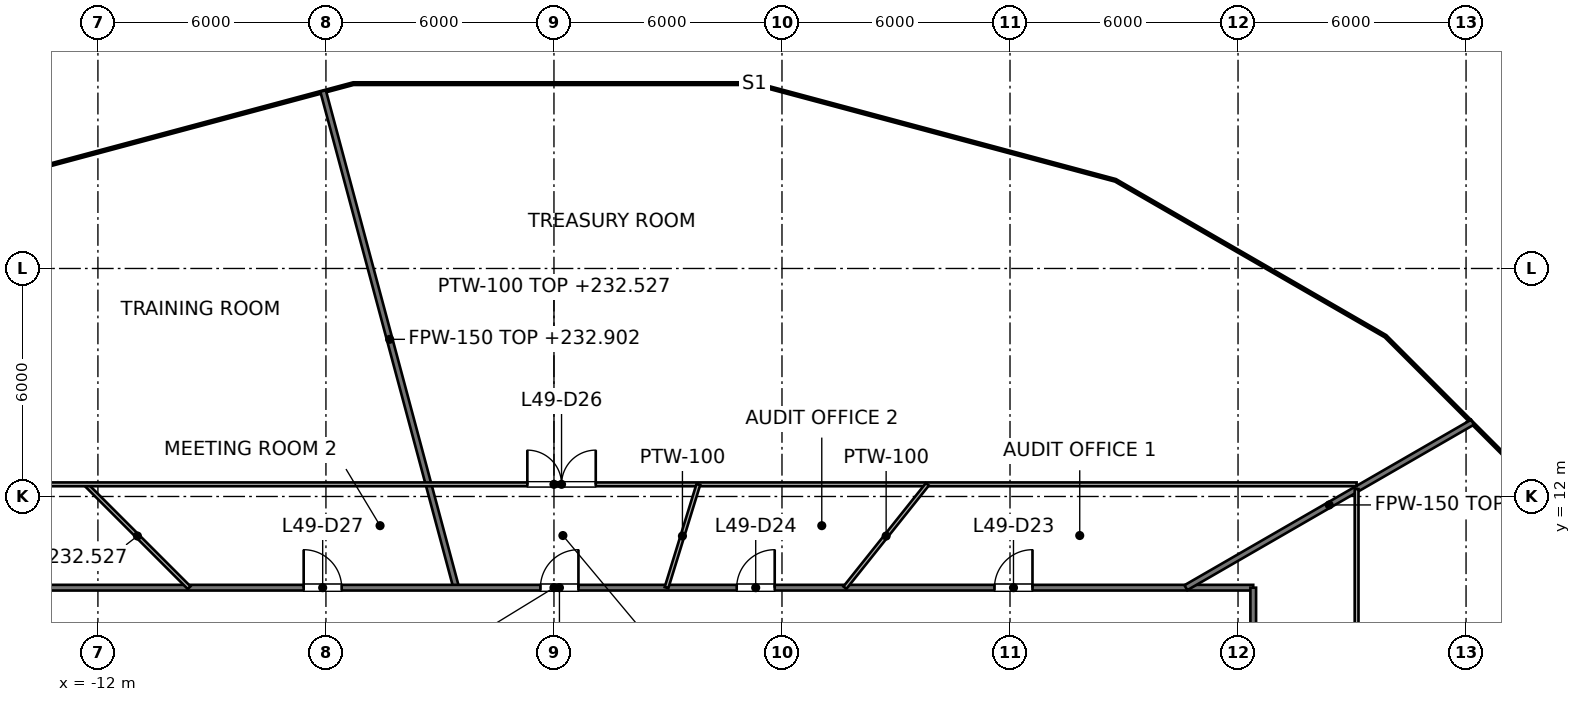
"""IFC4 building model, lengths in metres.
Left out: names, types, materials, properties, quantities, classifications, styles, units other than length and angle.
Written with IfcOpenShell. Run it as: python <this file> out.ifc"""

import sys

from ifc_helpers import new_model, si_unit, direction, frame, frame_2d, origin, place, context, subcontext, project, spatial, rectangle, extrude, element, fill, save


model = new_model("IFC4")
c1 = context("Model", 3, precision=1e-05, world=origin(), true_north=direction((0.0, 1.0)))
c2 = subcontext(c1, "Body", "Model", "MODEL_VIEW")
j1 = project(units=[si_unit("LENGTHUNIT", "METRE"), si_unit("PLANEANGLEUNIT", "RADIAN")], contexts=[c1])
p1 = place(None, origin())
s1 = spatial("IfcSite", under=j1, at=p1, CompositionType="ELEMENT")
p2 = place(p1, origin())
s2 = spatial("IfcBuilding", under=s1, at=p2, CompositionType="ELEMENT")
p3 = place(p2, frame((0.0, 0.0, 229.6)))
s3 = spatial("IfcBuildingStorey", under=s2, at=p3, CompositionType="ELEMENT", Elevation=229.6)
p4 = place(p3, frame((-6.075, 22.671, 0.0), z_axis=(0.0, 0.0, 1.0), x_axis=(0.258861735869, -0.965914386322, 0.0)))
e1 = element("IfcWall", 1, at=p4, inside=s3, PredefinedType="PARTITIONING", context=c2, shape_type="SweptSolid", body=[
    extrude(rectangle(XDim=13.532, YDim=0.15, at=frame_2d((6.766, 0.0))), origin(), (0.0, 0.0, 1.0), 3.302),
])
p5 = place(p3, frame((-18.4, 9.6, 0.0), z_axis=(0.0, 0.0, 1.0), x_axis=(1.0, 0.0, 0.0)))
e2 = element("IfcWall", 2, at=p5, inside=s3, PredefinedType="PARTITIONING", context=c2, shape_type="SweptSolid", body=[
    extrude(rectangle(XDim=36.8, YDim=0.15, at=frame_2d((18.4, 0.0))), origin(), (0.0, 0.0, 1.0), 2.927),
])
p6 = place(p5, frame((29.991, 0.0, 0.0)))
e3 = element("IfcOpeningElement", 3, at=p6, cuts=e2, PredefinedType="OPENING", context=c2, shape_type="SweptSolid", body=[
    extrude(rectangle(XDim=1.0, YDim=2.1, at=frame_2d((0.5, 1.05))), frame((0.0, 0.075, 0.0), z_axis=(0.0, -1.0, 0.0), x_axis=(1.0, 0.0, 0.0)), (0.0, 0.0, 1.0), 0.15),
])
p7 = place(p5, frame((23.208, 0.0, 0.0)))
e4 = element("IfcOpeningElement", 4, at=p7, cuts=e2, PredefinedType="OPENING", context=c2, shape_type="SweptSolid", body=[
    extrude(rectangle(XDim=1.0, YDim=2.1, at=frame_2d((0.5, 1.05))), frame((0.0, 0.075, 0.0), z_axis=(0.0, -1.0, 0.0), x_axis=(1.0, 0.0, 0.0)), (0.0, 0.0, 1.0), 0.15),
])
p8 = place(p5, frame((18.044, 0.0, 0.0)))
e5 = element("IfcOpeningElement", 5, at=p8, cuts=e2, PredefinedType="OPENING", context=c2, shape_type="SweptSolid", body=[
    extrude(rectangle(XDim=1.0, YDim=2.1, at=frame_2d((0.5, 1.05))), frame((0.0, 0.075, 0.0), z_axis=(0.0, -1.0, 0.0), x_axis=(1.0, 0.0, 0.0)), (0.0, 0.0, 1.0), 0.15),
])
p9 = place(p5, frame((11.814, 0.0, 0.0)))
e6 = element("IfcOpeningElement", 6, at=p9, cuts=e2, PredefinedType="OPENING", context=c2, shape_type="SweptSolid", body=[
    extrude(rectangle(XDim=1.0, YDim=2.1, at=frame_2d((0.5, 1.05))), frame((0.0, 0.075, 0.0), z_axis=(0.0, -1.0, 0.0), x_axis=(1.0, 0.0, 0.0)), (0.0, 0.0, 1.0), 0.15),
])
p10 = place(p3, frame((16.628, 9.6, 0.0), z_axis=(0.0, 0.0, 1.0), x_axis=(0.866023145199, 0.500003911965, 0.0)))
e7 = element("IfcWall", 7, at=p10, inside=s3, PredefinedType="PARTITIONING", context=c2, shape_type="SweptSolid", body=[
    extrude(rectangle(XDim=8.71, YDim=0.15, at=frame_2d((4.355, 0.0))), origin(), (0.0, 0.0, 1.0), 2.995),
])
p11 = place(p3, frame((18.4, -9.6, 0.0), z_axis=(0.0, 0.0, 1.0), x_axis=(0.0, 1.0, 0.0)))
e8 = element("IfcWall", 8, at=p11, inside=s3, PredefinedType="PARTITIONING", context=c2, shape_type="SweptSolid", body=[
    extrude(rectangle(XDim=19.2, YDim=0.15, at=frame_2d((9.6, 0.0))), origin(), (0.0, 0.0, 1.0), 2.918),
])
p12 = place(p11, frame((11.385, 0.0, 0.0)))
e9 = element("IfcOpeningElement", 9, at=p12, cuts=e8, PredefinedType="OPENING", context=c2, shape_type="SweptSolid", body=[
    extrude(rectangle(XDim=1.0, YDim=2.1, at=frame_2d((0.5, 1.05))), frame((0.0, 0.075, 0.0), z_axis=(0.0, -1.0, 0.0), x_axis=(1.0, 0.0, 0.0)), (0.0, 0.0, 1.0), 0.15),
])
p13 = place(p3, frame((-12.32, 12.32, 0.0), z_axis=(0.0, 0.0, 1.0), x_axis=(0.707106781187, -0.707106781187, 0.0)))
e10 = element("IfcWall", 10, at=p13, inside=s3, PredefinedType="PARTITIONING", context=c2, shape_type="SweptSolid", body=[
    extrude(rectangle(XDim=3.847, YDim=0.1, at=frame_2d((1.923, 0.0))), origin(), (0.0, 0.0, 1.0), 2.927),
])
p14 = place(p3, frame((-21.12, 12.32, 0.0), z_axis=(0.0, 0.0, 1.0), x_axis=(1.0, 0.0, 0.0)))
e11 = element("IfcWall", 11, at=p14, inside=s3, PredefinedType="PARTITIONING", context=c2, shape_type="SweptSolid", body=[
    extrude(rectangle(XDim=42.24, YDim=0.1, at=frame_2d((21.12, 0.0))), origin(), (0.0, 0.0, 1.0), 2.927),
])
p15 = place(p14, frame((20.419, 0.0, 0.0)))
e12 = element("IfcOpeningElement", 12, at=p15, cuts=e11, PredefinedType="OPENING", context=c2, shape_type="SweptSolid", body=[
    extrude(rectangle(XDim=1.8, YDim=2.1, at=frame_2d((0.9, 1.05))), frame((0.0, 0.05, 0.0), z_axis=(0.0, -1.0, 0.0), x_axis=(1.0, 0.0, 0.0)), (0.0, 0.0, 1.0), 0.1),
])
p16 = place(p3, frame((7.656, 9.6, 0.0), z_axis=(0.0, 0.0, 1.0), x_axis=(0.623461874371, 0.78185375308, 0.0)))
e13 = element("IfcWall", 13, at=p16, inside=s3, PredefinedType="PARTITIONING", context=c2, shape_type="SweptSolid", body=[
    extrude(rectangle(XDim=3.479, YDim=0.1, at=frame_2d((1.739, 0.0))), origin(), (0.0, 0.0, 1.0), 3.85),
])
p17 = place(p3, frame((2.961, 9.6, 0.0), z_axis=(0.0, 0.0, 1.0), x_axis=(0.294790935958, 0.955561774077, 0.0)))
e14 = element("IfcWall", 14, at=p17, inside=s3, PredefinedType="PARTITIONING", context=c2, shape_type="SweptSolid", body=[
    extrude(rectangle(XDim=2.846, YDim=0.1, at=frame_2d((1.423, 0.0))), origin(), (0.0, 0.0, 1.0), 3.85),
])
p18 = place(p3, frame((21.12, -12.32, 0.0), z_axis=(0.0, 0.0, 1.0), x_axis=(0.0, 1.0, 0.0)))
e15 = element("IfcWall", 15, at=p18, inside=s3, PredefinedType="PARTITIONING", context=c2, shape_type="SweptSolid", body=[
    extrude(rectangle(XDim=24.513, YDim=0.1, at=frame_2d((12.257, 0.0))), origin(), (0.0, 0.0, 1.0), 2.918),
])
p19 = place(p18, frame((14.687, 0.0, 0.0)))
e16 = element("IfcOpeningElement", 16, at=p19, cuts=e15, PredefinedType="OPENING", context=c2, shape_type="SweptSolid", body=[
    extrude(rectangle(XDim=1.8, YDim=2.1, at=frame_2d((0.9, 1.05))), frame((0.0, 0.05, 0.0), z_axis=(0.0, -1.0, 0.0), x_axis=(1.0, 0.0, 0.0)), (0.0, 0.0, 1.0), 0.1),
])
p20 = place(p6, origin())
e17 = element("IfcDoor", 17, at=p20, inside=s3, OperationType="SINGLE_SWING_RIGHT", PredefinedType="DOOR", context=c2, shape_type="SweptSolid", body=[
    extrude(rectangle(XDim=1.0, YDim=2.1, at=frame_2d((0.5, 1.05))), frame((0.0, 0.025, 0.0), z_axis=(0.0, -1.0, 0.0), x_axis=(1.0, 0.0, 0.0)), (0.0, 0.0, 1.0), 0.05),
])
fill(e3, e17)
p21 = place(p7, origin())
e18 = element("IfcDoor", 18, at=p21, inside=s3, OperationType="SINGLE_SWING_RIGHT", PredefinedType="DOOR", context=c2, shape_type="SweptSolid", body=[
    extrude(rectangle(XDim=1.0, YDim=2.1, at=frame_2d((0.5, 1.05))), frame((0.0, 0.025, 0.0), z_axis=(0.0, -1.0, 0.0), x_axis=(1.0, 0.0, 0.0)), (0.0, 0.0, 1.0), 0.05),
])
fill(e4, e18)
p22 = place(p8, origin())
e19 = element("IfcDoor", 19, at=p22, inside=s3, OperationType="SINGLE_SWING_RIGHT", PredefinedType="DOOR", context=c2, shape_type="SweptSolid", body=[
    extrude(rectangle(XDim=1.0, YDim=2.1, at=frame_2d((0.5, 1.05))), frame((0.0, 0.025, 0.0), z_axis=(0.0, -1.0, 0.0), x_axis=(1.0, 0.0, 0.0)), (0.0, 0.0, 1.0), 0.05),
])
fill(e5, e19)
p23 = place(p15, origin())
e20 = element("IfcDoor", 20, at=p23, inside=s3, OperationType="DOUBLE_DOOR_SINGLE_SWING", PredefinedType="DOOR", context=c2, shape_type="SweptSolid", body=[
    extrude(rectangle(XDim=1.8, YDim=2.1, at=frame_2d((0.9, 1.05))), frame((0.0, 0.025, 0.0), z_axis=(0.0, -1.0, 0.0), x_axis=(1.0, 0.0, 0.0)), (0.0, 0.0, 1.0), 0.05),
])
fill(e12, e20)
p24 = place(p9, origin())
e21 = element("IfcDoor", 21, at=p24, inside=s3, OperationType="SINGLE_SWING_LEFT", PredefinedType="DOOR", context=c2, shape_type="SweptSolid", body=[
    extrude(rectangle(XDim=1.0, YDim=2.1, at=frame_2d((0.5, 1.05))), frame((0.0, 0.025, 0.0), z_axis=(0.0, -1.0, 0.0), x_axis=(1.0, 0.0, 0.0)), (0.0, 0.0, 1.0), 0.05),
])
fill(e6, e21)
save(model, sys.argv[1])
